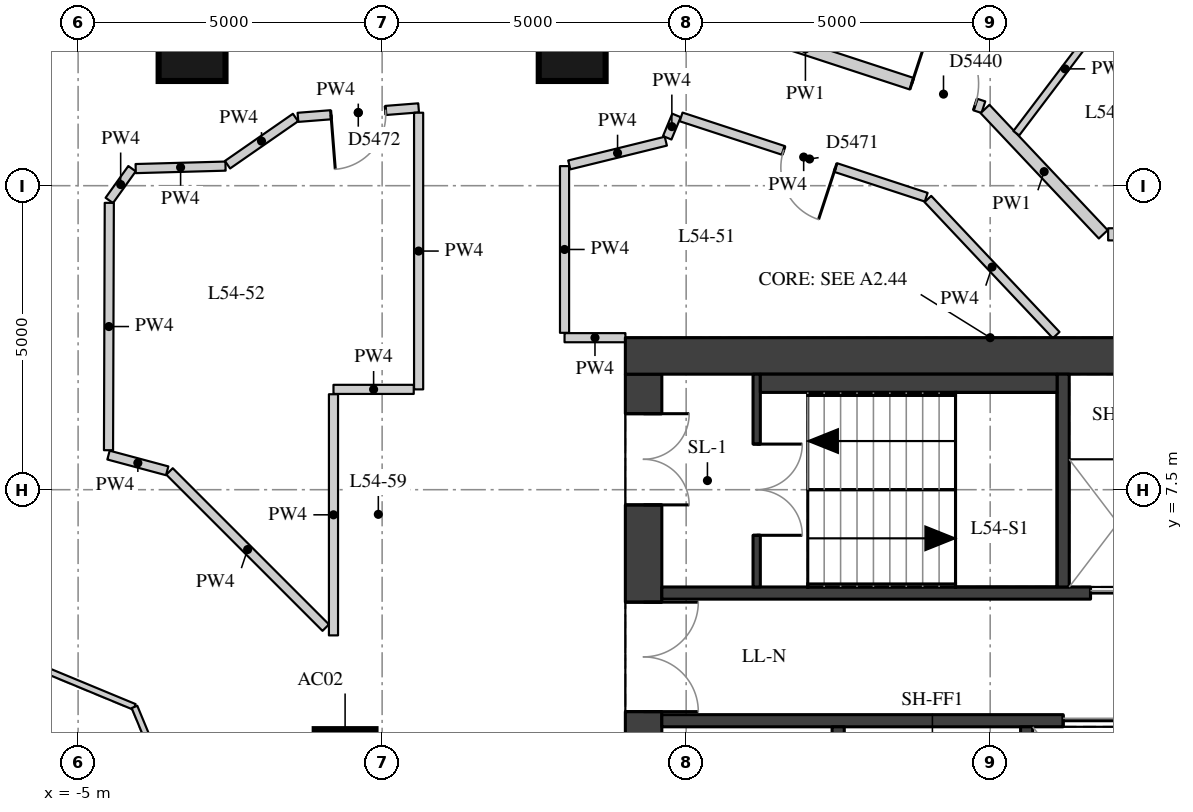
"""IFC4 building model, lengths in metres.
Left out: names, types, materials, properties, quantities, classifications, styles, units other than length and angle.
Written with IfcOpenShell. Run it as: python <this file> out.ifc"""

import sys

from ifc_helpers import new_model, si_unit, direction, frame, frame_2d, origin, origin_2d, place, context, subcontext, project, spatial, rectangle, extrude, element, fill, save


model = new_model("IFC4")
c1 = context("Model", 3, precision=1e-05, world=origin(), true_north=direction((0.0, 1.0)))
c2 = subcontext(c1, "Body", "Model", "MODEL_VIEW")
j1 = project(units=[si_unit("LENGTHUNIT", "METRE"), si_unit("PLANEANGLEUNIT", "RADIAN")], contexts=[c1])
p1 = place(None, origin())
s1 = spatial("IfcSite", under=j1, at=p1, CompositionType="ELEMENT")
p2 = place(p1, origin())
s2 = spatial("IfcBuilding", under=s1, at=p2, CompositionType="ELEMENT")
p3 = place(p2, frame((0.0, 0.0, 192.5)))
s3 = spatial("IfcBuildingStorey", under=s2, at=p3, CompositionType="ELEMENT", Elevation=192.5)
p4 = place(p3, frame((-0.609, 3.062, 0.0), z_axis=(0.0, 0.0, 1.0), x_axis=(1.0, 0.0, 0.0)))
e1 = element("IfcColumn", 1, at=p4, inside=s3, PredefinedType="COLUMN", context=c2, shape_type="SweptSolid", body=[
    extrude(rectangle(XDim=1.0, YDim=1.0, at=origin_2d()), origin(), (0.0, 0.0, 1.0), 3.3),
])
for number, where, z_axis, x_axis in (
    (2, (3.126, 14.772, 0.0), (0.0, 0.0, 1.0), (1.0, 0.0, 0.0)),
    (3, (-3.126, 14.772, 0.0), (0.0, 0.0, 1.0), (1.0, 0.0, 0.0)),
):
    element("IfcColumn", number, at=place(p3, frame(where, z_axis=z_axis, x_axis=x_axis)), inside=s3, PredefinedType="COLUMN", context=c2, shape_type="SweptSolid", body=[
        extrude(rectangle(XDim=1.1, YDim=1.1, at=origin_2d()), origin(), (0.0, 0.0, 1.0), 3.3),
    ])
p5 = place(p3, frame((4.3, -9.4, 0.0), z_axis=(0.0, 0.0, 1.0), x_axis=(0.0, 1.0, 0.0)))
e4 = element("IfcWall", 4, at=p5, inside=s3, PredefinedType="SHEAR", context=c2, shape_type="SweptSolid", body=[
    extrude(rectangle(XDim=18.8, YDim=0.6, at=frame_2d((9.4, 0.0))), origin(), (0.0, 0.0, 1.0), 3.02),
])
p6 = place(p5, frame((0.65, 0.0, 0.0)))
e5 = element("IfcOpeningElement", 5, at=p6, cuts=e4, PredefinedType="OPENING", context=c2, shape_type="SweptSolid", body=[
    extrude(rectangle(XDim=1.5, YDim=2.1, at=frame_2d((0.75, 1.05))), frame((0.0, 0.31, 0.0), z_axis=(0.0, -1.0, 0.0), x_axis=(1.0, 0.0, 0.0)), (0.0, 0.0, 1.0), 0.62),
])
p7 = place(p5, frame((3.75, 0.0, 0.0)))
e6 = element("IfcOpeningElement", 6, at=p7, cuts=e4, PredefinedType="OPENING", context=c2, shape_type="SweptSolid", body=[
    extrude(rectangle(XDim=1.8, YDim=2.1, at=frame_2d((0.9, 1.05))), frame((0.0, 0.31, 0.0), z_axis=(0.0, -1.0, 0.0), x_axis=(1.0, 0.0, 0.0)), (0.0, 0.0, 1.0), 0.62),
])
p8 = place(p5, frame((6.25, 0.0, 0.0)))
e7 = element("IfcOpeningElement", 7, at=p8, cuts=e4, PredefinedType="OPENING", context=c2, shape_type="SweptSolid", body=[
    extrude(rectangle(XDim=1.1, YDim=2.1, at=frame_2d((0.55, 1.05))), frame((0.0, 0.31, 0.0), z_axis=(0.0, -1.0, 0.0), x_axis=(1.0, 0.0, 0.0)), (0.0, 0.0, 1.0), 0.62),
])
p9 = place(p5, frame((8.9, 0.0, 0.0)))
e8 = element("IfcOpeningElement", 8, at=p9, cuts=e4, PredefinedType="OPENING", context=c2, shape_type="SweptSolid", body=[
    extrude(rectangle(XDim=1.0, YDim=2.1, at=frame_2d((0.5, 1.05))), frame((0.0, 0.31, 0.0), z_axis=(0.0, -1.0, 0.0), x_axis=(1.0, 0.0, 0.0)), (0.0, 0.0, 1.0), 0.62),
])
p10 = place(p5, frame((11.45, 0.0, 0.0)))
e9 = element("IfcOpeningElement", 9, at=p10, cuts=e4, PredefinedType="OPENING", context=c2, shape_type="SweptSolid", body=[
    extrude(rectangle(XDim=1.1, YDim=2.1, at=frame_2d((0.55, 1.05))), frame((0.0, 0.31, 0.0), z_axis=(0.0, -1.0, 0.0), x_axis=(1.0, 0.0, 0.0)), (0.0, 0.0, 1.0), 0.62),
])
p11 = place(p5, frame((13.25, 0.0, 0.0)))
e10 = element("IfcOpeningElement", 10, at=p11, cuts=e4, PredefinedType="OPENING", context=c2, shape_type="SweptSolid", body=[
    extrude(rectangle(XDim=1.8, YDim=2.1, at=frame_2d((0.9, 1.05))), frame((0.0, 0.31, 0.0), z_axis=(0.0, -1.0, 0.0), x_axis=(1.0, 0.0, 0.0)), (0.0, 0.0, 1.0), 0.62),
])
p12 = place(p5, frame((16.65, 0.0, 0.0)))
e11 = element("IfcOpeningElement", 11, at=p12, cuts=e4, PredefinedType="OPENING", context=c2, shape_type="SweptSolid", body=[
    extrude(rectangle(XDim=1.5, YDim=2.1, at=frame_2d((0.75, 1.05))), frame((0.0, 0.31, 0.0), z_axis=(0.0, -1.0, 0.0), x_axis=(1.0, 0.0, 0.0)), (0.0, 0.0, 1.0), 0.62),
])
p13 = place(p3, frame((4.0, 9.7, 0.0), z_axis=(0.0, 0.0, 1.0), x_axis=(1.0, 0.0, 0.0)))
e12 = element("IfcWall", 12, at=p13, inside=s3, PredefinedType="SHEAR", context=c2, shape_type="SweptSolid", body=[
    extrude(rectangle(XDim=12.0, YDim=0.6, at=frame_2d((6.0, 0.0))), origin(), (0.0, 0.0, 1.0), 3.02),
])
p14 = place(p3, frame((4.6, 5.8, 0.0), z_axis=(0.0, 0.0, 1.0), x_axis=(1.0, 0.0, 0.0)))
e13 = element("IfcWall", 13, at=p14, inside=s3, PredefinedType="SHEAR", context=c2, shape_type="SweptSolid", body=[
    extrude(rectangle(XDim=10.8, YDim=0.2, at=frame_2d((5.4, 0.0))), origin(), (0.0, 0.0, 1.0), 3.02),
])
p15 = place(p14, frame((7.05, 0.0, 0.0)))
e14 = element("IfcOpeningElement", 14, at=p15, cuts=e13, PredefinedType="OPENING", context=c2, shape_type="SweptSolid", body=[
    extrude(rectangle(XDim=1.1, YDim=2.1, at=frame_2d((0.55, 1.05))), frame((0.0, 0.11, 0.0), z_axis=(0.0, -1.0, 0.0), x_axis=(1.0, 0.0, 0.0)), (0.0, 0.0, 1.0), 0.22),
])
p16 = place(p14, frame((9.05, 0.0, 0.0)))
e15 = element("IfcOpeningElement", 15, at=p16, cuts=e13, PredefinedType="OPENING", context=c2, shape_type="SweptSolid", body=[
    extrude(rectangle(XDim=1.1, YDim=2.1, at=frame_2d((0.55, 1.05))), frame((0.0, 0.11, 0.0), z_axis=(0.0, -1.0, 0.0), x_axis=(1.0, 0.0, 0.0)), (0.0, 0.0, 1.0), 0.22),
])
p17 = place(p3, frame((4.6, 3.7, 0.0), z_axis=(0.0, 0.0, 1.0), x_axis=(1.0, 0.0, 0.0)))
e16 = element("IfcWall", 16, at=p17, inside=s3, PredefinedType="SHEAR", context=c2, shape_type="SweptSolid", body=[
    extrude(rectangle(XDim=10.8, YDim=0.2, at=frame_2d((5.4, 0.0))), origin(), (0.0, 0.0, 1.0), 3.02),
])
p18 = place(p17, frame((6.6, 0.0, 0.0)))
e17 = element("IfcOpeningElement", 17, at=p18, cuts=e16, PredefinedType="OPENING", context=c2, shape_type="SweptSolid", body=[
    extrude(rectangle(XDim=1.1, YDim=2.1, at=frame_2d((0.55, 1.05))), frame((0.0, 0.11, 0.0), z_axis=(0.0, -1.0, 0.0), x_axis=(1.0, 0.0, 0.0)), (0.0, 0.0, 1.0), 0.22),
])
p19 = place(p17, frame((8.9, 0.0, 0.0)))
e18 = element("IfcOpeningElement", 18, at=p19, cuts=e16, PredefinedType="OPENING", context=c2, shape_type="SweptSolid", body=[
    extrude(rectangle(XDim=1.1, YDim=2.1, at=frame_2d((0.55, 1.05))), frame((0.0, 0.11, 0.0), z_axis=(0.0, -1.0, 0.0), x_axis=(1.0, 0.0, 0.0)), (0.0, 0.0, 1.0), 0.22),
])
p20 = place(p3, frame((11.2, 5.9, 0.0), z_axis=(0.0, 0.0, 1.0), x_axis=(0.0, 1.0, 0.0)))
e19 = element("IfcWall", 19, at=p20, inside=s3, PredefinedType="SHEAR", context=c2, shape_type="SweptSolid", body=[
    extrude(rectangle(XDim=3.5, YDim=0.2, at=frame_2d((1.75, 0.0))), origin(), (0.0, 0.0, 1.0), 3.02),
])
p21 = place(p3, frame((7.5, 1.1, 0.0), z_axis=(0.0, 0.0, 1.0), x_axis=(0.0, 1.0, 0.0)))
e20 = element("IfcWall", 20, at=p21, inside=s3, PredefinedType="SHEAR", context=c2, shape_type="SweptSolid", body=[
    extrude(rectangle(XDim=2.5, YDim=0.2, at=frame_2d((1.25, 0.0))), origin(), (0.0, 0.0, 1.0), 3.02),
])
p22 = place(p21, frame((0.7, 0.0, 0.0)))
e21 = element("IfcOpeningElement", 21, at=p22, cuts=e20, PredefinedType="OPENING", context=c2, shape_type="SweptSolid", body=[
    extrude(rectangle(XDim=1.1, YDim=2.1, at=frame_2d((0.55, 1.05))), frame((0.0, 0.11, 0.0), z_axis=(0.0, -1.0, 0.0), x_axis=(1.0, 0.0, 0.0)), (0.0, 0.0, 1.0), 0.22),
])
p23 = place(p3, frame((10.6, 1.1, 0.0), z_axis=(0.0, 0.0, 1.0), x_axis=(0.0, 1.0, 0.0)))
e22 = element("IfcWall", 22, at=p23, inside=s3, PredefinedType="SHEAR", context=c2, shape_type="SweptSolid", body=[
    extrude(rectangle(XDim=2.5, YDim=0.2, at=frame_2d((1.25, 0.0))), origin(), (0.0, 0.0, 1.0), 3.02),
])
p24 = place(p3, frame((6.16, 5.9, 0.0), z_axis=(0.0, 0.0, 1.0), x_axis=(0.0, 1.0, 0.0)))
e23 = element("IfcWall", 23, at=p24, inside=s3, PredefinedType="SHEAR", context=c2, shape_type="SweptSolid", body=[
    extrude(rectangle(XDim=3.5, YDim=0.12, at=frame_2d((1.75, 0.0))), origin(), (0.0, 0.0, 1.0), 3.02),
])
p25 = place(p24, frame((0.85, 0.0, 0.0)))
e24 = element("IfcOpeningElement", 24, at=p25, cuts=e23, PredefinedType="OPENING", context=c2, shape_type="SweptSolid", body=[
    extrude(rectangle(XDim=1.5, YDim=2.1, at=frame_2d((0.75, 1.05))), frame((0.0, 0.07, 0.0), z_axis=(0.0, -1.0, 0.0), x_axis=(1.0, 0.0, 0.0)), (0.0, 0.0, 1.0), 0.14),
])
p26 = place(p3, frame((6.22, 9.25, 0.0), z_axis=(0.0, 0.0, 1.0), x_axis=(1.0, 0.0, 0.0)))
e25 = element("IfcWall", 25, at=p26, inside=s3, PredefinedType="PARTITIONING", context=c2, shape_type="SweptSolid", body=[
    extrude(rectangle(XDim=4.88, YDim=0.3, at=frame_2d((2.44, 0.0))), origin(), (0.0, 0.0, 1.0), 3.02),
])
p27 = place(p3, frame((4.035, 15.708, 0.0), z_axis=(0.0, 0.0, 1.0), x_axis=(0.950331063317, -0.31124085544, 0.0)))
e26 = element("IfcWall", 26, at=p27, inside=s3, PredefinedType="PARTITIONING", context=c2, shape_type="SweptSolid", body=[
    extrude(rectangle(XDim=6.159, YDim=0.2, at=frame_2d((3.08, 0.0))), origin(), (0.0, 0.0, 1.0), 3.02),
])
p28 = place(p27, frame((4.919, 0.0, 0.0)))
e27 = element("IfcOpeningElement", 27, at=p28, cuts=e26, PredefinedType="OPENING", context=c2, shape_type="SweptSolid", body=[
    extrude(rectangle(XDim=1.1, YDim=2.1, at=frame_2d((0.55, 1.05))), frame((0.0, 0.11, 0.0), z_axis=(0.0, -1.0, 0.0), x_axis=(1.0, 0.0, 0.0)), (0.0, 0.0, 1.0), 0.22),
])
p29 = place(p27, frame((1.189, 0.0, 0.0)))
e28 = element("IfcOpeningElement", 28, at=p29, cuts=e26, PredefinedType="OPENING", context=c2, shape_type="SweptSolid", body=[
    extrude(rectangle(XDim=0.9, YDim=2.1, at=frame_2d((0.45, 1.05))), frame((0.0, 0.11, 0.0), z_axis=(0.0, -1.0, 0.0), x_axis=(1.0, 0.0, 0.0)), (0.0, 0.0, 1.0), 0.22),
])
p30 = place(p3, frame((9.916, 13.762, 0.0), z_axis=(0.0, 0.0, 1.0), x_axis=(0.686041532799, -0.727562378958, 0.0)))
e29 = element("IfcWall", 29, at=p30, inside=s3, PredefinedType="PARTITIONING", context=c2, shape_type="SweptSolid", body=[
    extrude(rectangle(XDim=2.834, YDim=0.2, at=frame_2d((1.417, 0.0))), origin(), (0.0, 0.0, 1.0), 3.02),
])
p31 = place(p3, frame((11.94, 11.7, 0.0), z_axis=(0.0, 0.0, 1.0), x_axis=(1.0, 0.0, 0.0)))
e30 = element("IfcWall", 30, at=p31, inside=s3, PredefinedType="PARTITIONING", context=c2, shape_type="SweptSolid", body=[
    extrude(rectangle(XDim=5.76, YDim=0.2, at=frame_2d((2.88, 0.0))), origin(), (0.0, 0.0, 1.0), 3.02),
])
p32 = place(p31, frame((1.927, 0.0, 0.0)))
e31 = element("IfcOpeningElement", 31, at=p32, cuts=e30, PredefinedType="OPENING", context=c2, shape_type="SweptSolid", body=[
    extrude(rectangle(XDim=1.8, YDim=2.1, at=frame_2d((0.9, 1.05))), frame((0.0, 0.11, 0.0), z_axis=(0.0, -1.0, 0.0), x_axis=(1.0, 0.0, 0.0)), (0.0, 0.0, 1.0), 0.22),
])
p33 = place(p3, frame((4.001, 10.0, 0.0), z_axis=(0.0, 0.0, 1.0), x_axis=(-1.0, 0.0, 0.0)))
e32 = element("IfcWall", 32, at=p33, inside=s3, PredefinedType="PARTITIONING", context=c2, shape_type="SweptSolid", body=[
    extrude(rectangle(XDim=1.001, YDim=0.15, at=frame_2d((0.5, 0.0))), origin(), (0.0, 0.0, 1.0), 3.02),
])
p34 = place(p3, frame((3.0, 10.08, 0.0), z_axis=(0.0, 0.0, 1.0), x_axis=(0.0, 1.0, 0.0)))
e33 = element("IfcWall", 33, at=p34, inside=s3, PredefinedType="PARTITIONING", context=c2, shape_type="SweptSolid", body=[
    extrude(rectangle(XDim=2.742, YDim=0.15, at=frame_2d((1.371, 0.0))), origin(), (0.0, 0.0, 1.0), 3.02),
])
p35 = place(p3, frame((3.078, 12.842, 0.0), z_axis=(0.0, 0.0, 1.0), x_axis=(0.9710404657, 0.238915076906, 0.0)))
e34 = element("IfcWall", 34, at=p35, inside=s3, PredefinedType="PARTITIONING", context=c2, shape_type="SweptSolid", body=[
    extrude(rectangle(XDim=1.635, YDim=0.15, at=frame_2d((0.817, 0.0))), origin(), (0.0, 0.0, 1.0), 3.02),
])
p36 = place(p3, frame((4.688, 13.288, 0.0), z_axis=(0.0, 0.0, 1.0), x_axis=(0.38330857492, 0.923620342128, 0.0)))
e35 = element("IfcWall", 35, at=p36, inside=s3, PredefinedType="PARTITIONING", context=c2, shape_type="SweptSolid", body=[
    extrude(rectangle(XDim=0.398, YDim=0.15, at=frame_2d((0.199, 0.0))), origin(), (0.0, 0.0, 1.0), 3.02),
])
p37 = place(p3, frame((4.917, 13.631, 0.0), z_axis=(0.0, 0.0, 1.0), x_axis=(0.950299632499, -0.311336808733, 0.0)))
e36 = element("IfcWall", 36, at=p37, inside=s3, PredefinedType="PARTITIONING", context=c2, shape_type="SweptSolid", body=[
    extrude(rectangle(XDim=4.241, YDim=0.15, at=frame_2d((2.121, 0.0))), origin(), (0.0, 0.0, 1.0), 3.02),
])
p38 = place(p37, frame((1.773, 0.0, 0.0)))
e37 = element("IfcOpeningElement", 37, at=p38, cuts=e36, PredefinedType="OPENING", context=c2, shape_type="SweptSolid", body=[
    extrude(rectangle(XDim=0.9, YDim=2.1, at=frame_2d((0.45, 1.05))), frame((0.0, 0.085, 0.0), z_axis=(0.0, -1.0, 0.0), x_axis=(1.0, 0.0, 0.0)), (0.0, 0.0, 1.0), 0.17),
])
p39 = place(p3, frame((8.975, 12.281, 0.0), z_axis=(0.0, 0.0, 1.0), x_axis=(0.686010468192, -0.727591669503, 0.0)))
e38 = element("IfcWall", 38, at=p39, inside=s3, PredefinedType="PARTITIONING", context=c2, shape_type="SweptSolid", body=[
    extrude(rectangle(XDim=3.077, YDim=0.15, at=frame_2d((1.538, 0.0))), origin(), (0.0, 0.0, 1.0), 3.02),
])
p40 = place(p3, frame((-4.487, 12.258, 0.0), z_axis=(0.0, 0.0, 1.0), x_axis=(0.582280364551, 0.812988054684, 0.0)))
e39 = element("IfcWall", 39, at=p40, inside=s3, PredefinedType="PARTITIONING", context=c2, shape_type="SweptSolid", body=[
    extrude(rectangle(XDim=0.642, YDim=0.15, at=frame_2d((0.321, 0.0))), origin(), (0.0, 0.0, 1.0), 3.02),
])
p41 = place(p3, frame((-4.053, 12.781, 0.0), z_axis=(0.0, 0.0, 1.0), x_axis=(0.999619372091, 0.027588239157, 0.0)))
e40 = element("IfcWall", 40, at=p41, inside=s3, PredefinedType="PARTITIONING", context=c2, shape_type="SweptSolid", body=[
    extrude(rectangle(XDim=1.478, YDim=0.15, at=frame_2d((0.739, 0.0))), origin(), (0.0, 0.0, 1.0), 3.02),
])
p42 = place(p3, frame((-2.543, 12.845, 0.0), z_axis=(0.0, 0.0, 1.0), x_axis=(0.821558970312, 0.570123546523, 0.0)))
e41 = element("IfcWall", 41, at=p42, inside=s3, PredefinedType="PARTITIONING", context=c2, shape_type="SweptSolid", body=[
    extrude(rectangle(XDim=1.361, YDim=0.15, at=frame_2d((0.681, 0.0))), origin(), (0.0, 0.0, 1.0), 3.02),
])
p43 = place(p3, frame((-1.385, 13.624, 0.0), z_axis=(0.0, 0.0, 1.0), x_axis=(0.996924678821, 0.078365711621, 0.0)))
e42 = element("IfcWall", 42, at=p43, inside=s3, PredefinedType="PARTITIONING", context=c2, shape_type="SweptSolid", body=[
    extrude(rectangle(XDim=1.991, YDim=0.15, at=frame_2d((0.995, 0.0))), origin(), (0.0, 0.0, 1.0), 3.02),
])
p44 = place(p43, frame((0.545, 0.0, 0.0)))
e43 = element("IfcOpeningElement", 43, at=p44, cuts=e42, PredefinedType="OPENING", context=c2, shape_type="SweptSolid", body=[
    extrude(rectangle(XDim=0.9, YDim=2.1, at=frame_2d((0.45, 1.05))), frame((0.0, 0.085, 0.0), z_axis=(0.0, -1.0, 0.0), x_axis=(1.0, 0.0, 0.0)), (0.0, 0.0, 1.0), 0.17),
])
p45 = place(p3, frame((0.6, 13.7, 0.0), z_axis=(0.0, 0.0, 1.0), x_axis=(0.0, -1.0, 0.0)))
e44 = element("IfcWall", 44, at=p45, inside=s3, PredefinedType="PARTITIONING", context=c2, shape_type="SweptSolid", body=[
    extrude(rectangle(XDim=4.55, YDim=0.15, at=frame_2d((2.275, 0.0))), origin(), (0.0, 0.0, 1.0), 3.02),
])
p46 = place(p3, frame((0.52, 9.15, 0.0), z_axis=(0.0, 0.0, 1.0), x_axis=(-1.0, 0.0, 0.0)))
e45 = element("IfcWall", 45, at=p46, inside=s3, PredefinedType="PARTITIONING", context=c2, shape_type="SweptSolid", body=[
    extrude(rectangle(XDim=1.32, YDim=0.15, at=frame_2d((0.66, 0.0))), origin(), (0.0, 0.0, 1.0), 3.02),
])
p47 = place(p3, frame((-0.8, 9.07, 0.0), z_axis=(0.0, 0.0, 1.0), x_axis=(0.0, -1.0, 0.0)))
e46 = element("IfcWall", 46, at=p47, inside=s3, PredefinedType="PARTITIONING", context=c2, shape_type="SweptSolid", body=[
    extrude(rectangle(XDim=3.966, YDim=0.15, at=frame_2d((1.983, 0.0))), origin(), (0.0, 0.0, 1.0), 3.02),
])
p48 = place(p3, frame((-0.927, 5.231, 0.0), z_axis=(0.0, 0.0, 1.0), x_axis=(-0.707106781187, 0.707106781187, 0.0)))
e47 = element("IfcWall", 47, at=p48, inside=s3, PredefinedType="PARTITIONING", context=c2, shape_type="SweptSolid", body=[
    extrude(rectangle(XDim=3.633, YDim=0.15, at=frame_2d((1.817, 0.0))), origin(), (0.0, 0.0, 1.0), 3.02),
])
p49 = place(p3, frame((-3.535, 7.811, 0.0), z_axis=(0.0, 0.0, 1.0), x_axis=(-0.965921867197, 0.258833820183, 0.0)))
e48 = element("IfcWall", 48, at=p49, inside=s3, PredefinedType="PARTITIONING", context=c2, shape_type="SweptSolid", body=[
    extrude(rectangle(XDim=0.999, YDim=0.15, at=frame_2d((0.5, 0.0))), origin(), (0.0, 0.0, 1.0), 3.02),
])
p50 = place(p3, frame((-4.5, 8.149, 0.0), z_axis=(0.0, 0.0, 1.0), x_axis=(0.003180492795, 0.99999494222, 0.0)))
e49 = element("IfcWall", 49, at=p50, inside=s3, PredefinedType="PARTITIONING", context=c2, shape_type="SweptSolid", body=[
    extrude(rectangle(XDim=4.068, YDim=0.15, at=frame_2d((2.034, 0.0))), origin(), (0.0, 0.0, 1.0), 3.02),
])
p51 = place(p3, frame((10.43, 13.363, 0.0), z_axis=(0.0, 0.0, 1.0), x_axis=(0.603597479969, 0.797289208616, 0.0)))
e50 = element("IfcWall", 50, at=p51, inside=s3, PredefinedType="PARTITIONING", context=c2, shape_type="SweptSolid", body=[
    extrude(rectangle(XDim=2.656, YDim=0.12, at=frame_2d((1.328, 0.0))), origin(), (0.0, 0.0, 1.0), 3.02),
])
for number, where, z_axis, x_axis in (
    (51, (-8.0, 5.554, 0.0), (0.0, 0.0, 1.0), (0.924, -0.383, 0.0)),
    (52, (-4.073, 3.927, 0.0), (0.0, 0.0, 1.0), (0.383, -0.924, 0.0)),
):
    element("IfcWall", number, at=place(p3, frame(where, z_axis=z_axis, x_axis=x_axis)), inside=s3, PredefinedType="PARTITIONING", context=c2, shape_type="SweptSolid", body=[
        extrude(rectangle(XDim=4.251, YDim=0.1, at=frame_2d((2.125, 0.0))), origin(), (0.0, 0.0, 1.0), 3.02),
    ])
p52 = place(p11, origin())
e53 = element("IfcDoor", 53, at=p52, inside=s3, OperationType="DOUBLE_DOOR_SINGLE_SWING", PredefinedType="DOOR", context=c2, shape_type="SweptSolid", body=[
    extrude(rectangle(XDim=1.8, YDim=2.1, at=frame_2d((0.9, 1.05))), frame((0.0, 0.025, 0.0), z_axis=(0.0, -1.0, 0.0), x_axis=(1.0, 0.0, 0.0)), (0.0, 0.0, 1.0), 0.05),
])
fill(e10, e53)
p53 = place(p12, origin())
e54 = element("IfcDoor", 54, at=p53, inside=s3, OperationType="DOUBLE_DOOR_SINGLE_SWING", PredefinedType="DOOR", context=c2, shape_type="SweptSolid", body=[
    extrude(rectangle(XDim=1.5, YDim=2.1, at=frame_2d((0.75, 1.05))), frame((0.0, 0.025, 0.0), z_axis=(0.0, -1.0, 0.0), x_axis=(1.0, 0.0, 0.0)), (0.0, 0.0, 1.0), 0.05),
])
fill(e11, e54)
p54 = place(p25, origin())
e55 = element("IfcDoor", 55, at=p54, inside=s3, OperationType="DOUBLE_DOOR_SINGLE_SWING", PredefinedType="DOOR", context=c2, shape_type="SweptSolid", body=[
    extrude(rectangle(XDim=1.5, YDim=2.1, at=frame_2d((0.75, 1.05))), frame((0.0, 0.025, 0.0), z_axis=(0.0, -1.0, 0.0), x_axis=(1.0, 0.0, 0.0)), (0.0, 0.0, 1.0), 0.05),
])
fill(e24, e55)
p55 = place(p15, origin())
e56 = element("IfcDoor", 56, at=p55, inside=s3, OperationType="DOUBLE_DOOR_SLIDING", PredefinedType="DOOR", context=c2, shape_type="SweptSolid", body=[
    extrude(rectangle(XDim=1.1, YDim=2.1, at=frame_2d((0.55, 1.05))), frame((0.0, 0.025, 0.0), z_axis=(0.0, -1.0, 0.0), x_axis=(1.0, 0.0, 0.0)), (0.0, 0.0, 1.0), 0.05),
])
fill(e14, e56)
p56 = place(p18, origin())
e57 = element("IfcDoor", 57, at=p56, inside=s3, OperationType="DOUBLE_DOOR_SLIDING", PredefinedType="DOOR", context=c2, shape_type="SweptSolid", body=[
    extrude(rectangle(XDim=1.1, YDim=2.1, at=frame_2d((0.55, 1.05))), frame((0.0, 0.025, 0.0), z_axis=(0.0, -1.0, 0.0), x_axis=(1.0, 0.0, 0.0)), (0.0, 0.0, 1.0), 0.05),
])
fill(e17, e57)
p57 = place(p28, origin())
e58 = element("IfcDoor", 58, at=p57, inside=s3, OperationType="SINGLE_SWING_LEFT", PredefinedType="DOOR", context=c2, shape_type="SweptSolid", body=[
    extrude(rectangle(XDim=1.1, YDim=2.1, at=frame_2d((0.55, 1.05))), frame((0.0, 0.025, 0.0), z_axis=(0.0, -1.0, 0.0), x_axis=(1.0, 0.0, 0.0)), (0.0, 0.0, 1.0), 0.05),
])
fill(e27, e58)
p58 = place(p38, origin())
e59 = element("IfcDoor", 59, at=p58, inside=s3, OperationType="SINGLE_SWING_LEFT", PredefinedType="DOOR", context=c2, shape_type="SweptSolid", body=[
    extrude(rectangle(XDim=0.9, YDim=2.1, at=frame_2d((0.45, 1.05))), frame((0.0, 0.025, 0.0), z_axis=(0.0, -1.0, 0.0), x_axis=(1.0, 0.0, 0.0)), (0.0, 0.0, 1.0), 0.05),
])
fill(e37, e59)
p59 = place(p44, origin())
e60 = element("IfcDoor", 60, at=p59, inside=s3, OperationType="SINGLE_SWING_RIGHT", PredefinedType="DOOR", context=c2, shape_type="SweptSolid", body=[
    extrude(rectangle(XDim=0.9, YDim=2.1, at=frame_2d((0.45, 1.05))), frame((0.0, 0.025, 0.0), z_axis=(0.0, -1.0, 0.0), x_axis=(1.0, 0.0, 0.0)), (0.0, 0.0, 1.0), 0.05),
])
fill(e43, e60)
save(model, sys.argv[1])
